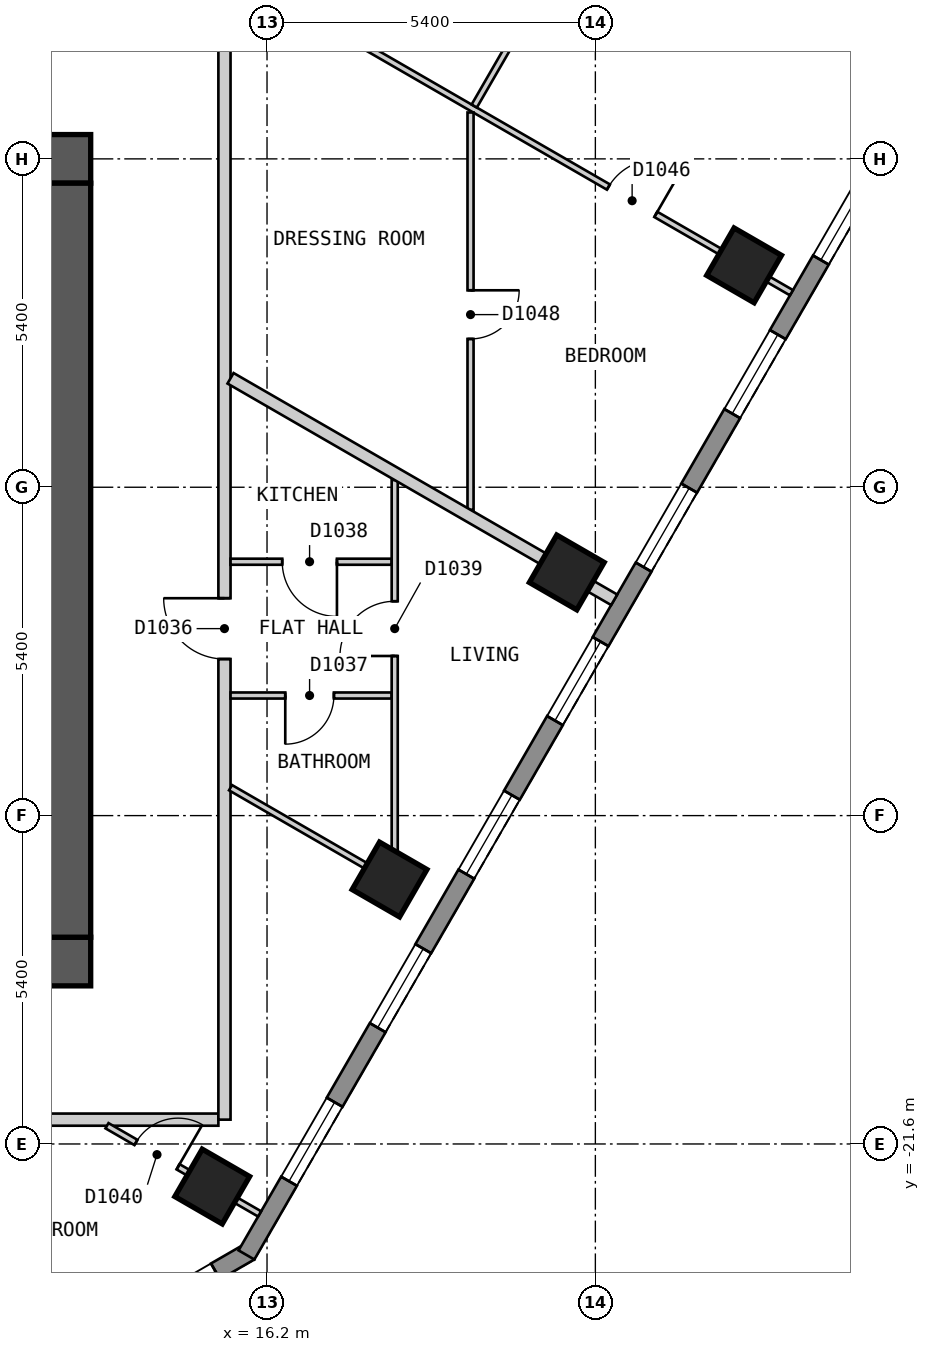
"""IFC4 building model, lengths in metres.
Left out: names, types, materials, properties, quantities, classifications, styles, units other than length and angle.
Written with IfcOpenShell. Run it as: python <this file> out.ifc"""

import sys

from ifc_helpers import new_model, si_unit, direction, frame, frame_2d, origin, origin_2d, place, context, subcontext, project, spatial, polyline, rectangle, outline, extrude, element, fill, save


model = new_model("IFC4")
c1 = context("Model", 3, precision=1e-05, world=origin(), true_north=direction((0.0, 1.0)))
c2 = subcontext(c1, "Body", "Model", "MODEL_VIEW")
j1 = project(units=[si_unit("LENGTHUNIT", "METRE"), si_unit("PLANEANGLEUNIT", "RADIAN")], contexts=[c1])
p1 = place(None, origin())
s1 = spatial("IfcSite", under=j1, at=p1, CompositionType="ELEMENT")
p2 = place(p1, origin())
s2 = spatial("IfcBuilding", under=s1, at=p2, CompositionType="ELEMENT")
p3 = place(p2, frame((0.0, 0.0, 126.6)))
s3 = spatial("IfcBuildingStorey", under=s2, at=p3, CompositionType="ELEMENT", Elevation=126.6)
for number, where, z_axis, x_axis in (
    (1, (15.299, -22.3, 0.0), (0.0, 0.0, 1.0), (0.5, 0.866, 0.0)),
    (2, (18.215, -17.251, 0.0), (0.0, 0.0, 1.0), (0.5, 0.866, 0.0)),
    (3, (21.13, -12.201, 0.0), (0.0, 0.0, 1.0), (0.5, 0.866, 0.0)),
    (4, (24.046, -7.151, 0.0), (0.0, 0.0, 1.0), (0.5, 0.866, 0.0)),
):
    element("IfcColumn", number, at=place(p3, frame(where, z_axis=z_axis, x_axis=x_axis)), inside=s3, PredefinedType="COLUMN", context=c2, shape_type="SweptSolid", body=[
        extrude(rectangle(XDim=0.9, YDim=0.9, at=origin_2d()), origin(), (0.0, 0.0, 1.0), 3.0),
    ])
p4 = place(p3, frame((-13.3, -18.6, 0.0), z_axis=(0.0, 0.0, 1.0), x_axis=(1.0, 0.0, 0.0)))
e5 = element("IfcWall", 5, at=p4, inside=s3, PredefinedType="SHEAR", context=c2, shape_type="SweptSolid", body=[
    extrude(rectangle(XDim=26.6, YDim=0.8, at=frame_2d((13.3, 0.0))), origin(), (0.0, 0.0, 1.0), 2.7),
])
p5 = place(p3, frame((-13.3, -5.4, 0.0), z_axis=(0.0, 0.0, 1.0), x_axis=(1.0, 0.0, 0.0)))
e6 = element("IfcWall", 6, at=p5, inside=s3, PredefinedType="SHEAR", context=c2, shape_type="SweptSolid", body=[
    extrude(rectangle(XDim=26.6, YDim=0.8, at=frame_2d((13.3, 0.0))), origin(), (0.0, 0.0, 1.0), 2.7),
])
p6 = place(p5, frame((23.65, 0.0, 0.0)))
e7 = element("IfcOpeningElement", 7, at=p6, cuts=e6, PredefinedType="OPENING", context=c2, shape_type="SweptSolid", body=[
    extrude(rectangle(XDim=1.2, YDim=2.1, at=frame_2d((0.6, 1.05))), frame((0.0, 0.41, 0.0), z_axis=(0.0, -1.0, 0.0), x_axis=(1.0, 0.0, 0.0)), (0.0, 0.0, 1.0), 0.82),
])
p7 = place(p3, frame((12.9, -18.2, 0.0), z_axis=(0.0, 0.0, 1.0), x_axis=(0.0, 1.0, 0.0)))
e8 = element("IfcWall", 8, at=p7, inside=s3, PredefinedType="SHEAR", context=c2, shape_type="SweptSolid", body=[
    extrude(rectangle(XDim=12.4, YDim=0.8, at=frame_2d((6.2, 0.0))), origin(), (0.0, 0.0, 1.0), 2.7),
])
p8 = place(p3, frame((11.587, -25.87, 0.0), z_axis=(0.0, 0.0, 1.0), x_axis=(0.866022959057, 0.500004234368, 0.0)))
e9 = element("IfcWall", 9, at=p8, inside=s3, PredefinedType="SOLIDWALL", context=c2, shape_type="SweptSolid", body=[
    extrude(outline(polyline([(0.0, -0.15), (5.0, -0.15), (4.92, 0.15), (0.08, 0.15), (0.0, -0.15)])), origin(), (0.0, 0.0, 1.0), 2.7),
])
p9 = place(p8, frame((0.65, 0.0, 0.15)))
e10 = element("IfcOpeningElement", 10, at=p9, cuts=e9, PredefinedType="OPENING", context=c2, shape_type="SweptSolid", body=[
    extrude(rectangle(XDim=1.2, YDim=2.1, at=frame_2d((0.6, 1.05))), frame((0.0, 0.16, 0.0), z_axis=(0.0, -1.0, 0.0), x_axis=(1.0, 0.0, 0.0)), (0.0, 0.0, 1.0), 0.32),
])
p10 = place(p8, frame((3.149, 0.0, 0.15)))
e11 = element("IfcOpeningElement", 11, at=p10, cuts=e9, PredefinedType="OPENING", context=c2, shape_type="SweptSolid", body=[
    extrude(rectangle(XDim=1.2, YDim=2.1, at=frame_2d((0.6, 1.05))), frame((0.0, 0.16, 0.0), z_axis=(0.0, -1.0, 0.0), x_axis=(1.0, 0.0, 0.0)), (0.0, 0.0, 1.0), 0.32),
])
p11 = place(p3, frame((15.862, -23.425, 0.0), z_axis=(0.0, 0.0, 1.0), x_axis=(0.500017503135, 0.866015298109, 0.0)))
e12 = element("IfcWall", 12, at=p11, inside=s3, PredefinedType="SOLIDWALL", context=c2, shape_type="SweptSolid", body=[
    extrude(outline(polyline([(0.0, -0.15), (24.711, -0.15), (24.631, 0.15), (0.08, 0.15), (0.0, -0.15)])), origin(), (0.0, 0.0, 1.0), 2.7),
])
p12 = place(p11, frame((1.4, 0.0, 0.15)))
e13 = element("IfcOpeningElement", 13, at=p12, cuts=e12, PredefinedType="OPENING", context=c2, shape_type="SweptSolid", body=[
    extrude(rectangle(XDim=1.5, YDim=2.1, at=frame_2d((0.75, 1.05))), frame((0.0, 0.16, 0.0), z_axis=(0.0, -1.0, 0.0), x_axis=(1.0, 0.0, 0.0)), (0.0, 0.0, 1.0), 0.32),
])
p13 = place(p11, frame((4.316, 0.0, 0.15)))
e14 = element("IfcOpeningElement", 14, at=p13, cuts=e12, PredefinedType="OPENING", context=c2, shape_type="SweptSolid", body=[
    extrude(rectangle(XDim=1.5, YDim=2.1, at=frame_2d((0.75, 1.05))), frame((0.0, 0.16, 0.0), z_axis=(0.0, -1.0, 0.0), x_axis=(1.0, 0.0, 0.0)), (0.0, 0.0, 1.0), 0.32),
])
p14 = place(p11, frame((7.231, 0.0, 0.15)))
e15 = element("IfcOpeningElement", 15, at=p14, cuts=e12, PredefinedType="OPENING", context=c2, shape_type="SweptSolid", body=[
    extrude(rectangle(XDim=1.5, YDim=2.1, at=frame_2d((0.75, 1.05))), frame((0.0, 0.16, 0.0), z_axis=(0.0, -1.0, 0.0), x_axis=(1.0, 0.0, 0.0)), (0.0, 0.0, 1.0), 0.32),
])
p15 = place(p11, frame((10.147, 0.0, 0.15)))
e16 = element("IfcOpeningElement", 16, at=p15, cuts=e12, PredefinedType="OPENING", context=c2, shape_type="SweptSolid", body=[
    extrude(rectangle(XDim=1.5, YDim=2.1, at=frame_2d((0.75, 1.05))), frame((0.0, 0.16, 0.0), z_axis=(0.0, -1.0, 0.0), x_axis=(1.0, 0.0, 0.0)), (0.0, 0.0, 1.0), 0.32),
])
p16 = place(p11, frame((13.062, 0.0, 0.15)))
e17 = element("IfcOpeningElement", 17, at=p16, cuts=e12, PredefinedType="OPENING", context=c2, shape_type="SweptSolid", body=[
    extrude(rectangle(XDim=1.5, YDim=2.1, at=frame_2d((0.75, 1.05))), frame((0.0, 0.16, 0.0), z_axis=(0.0, -1.0, 0.0), x_axis=(1.0, 0.0, 0.0)), (0.0, 0.0, 1.0), 0.32),
])
p17 = place(p11, frame((15.977, 0.0, 0.15)))
e18 = element("IfcOpeningElement", 18, at=p17, cuts=e12, PredefinedType="OPENING", context=c2, shape_type="SweptSolid", body=[
    extrude(rectangle(XDim=1.5, YDim=2.1, at=frame_2d((0.75, 1.05))), frame((0.0, 0.16, 0.0), z_axis=(0.0, -1.0, 0.0), x_axis=(1.0, 0.0, 0.0)), (0.0, 0.0, 1.0), 0.32),
])
p18 = place(p11, frame((18.893, 0.0, 0.15)))
e19 = element("IfcOpeningElement", 19, at=p18, cuts=e12, PredefinedType="OPENING", context=c2, shape_type="SweptSolid", body=[
    extrude(rectangle(XDim=1.5, YDim=2.1, at=frame_2d((0.75, 1.05))), frame((0.0, 0.16, 0.0), z_axis=(0.0, -1.0, 0.0), x_axis=(1.0, 0.0, 0.0)), (0.0, 0.0, 1.0), 0.32),
])
p19 = place(p11, frame((21.809, 0.0, 0.15)))
e20 = element("IfcOpeningElement", 20, at=p19, cuts=e12, PredefinedType="OPENING", context=c2, shape_type="SweptSolid", body=[
    extrude(rectangle(XDim=1.5, YDim=2.1, at=frame_2d((0.75, 1.05))), frame((0.0, 0.16, 0.0), z_axis=(0.0, -1.0, 0.0), x_axis=(1.0, 0.0, 0.0)), (0.0, 0.0, 1.0), 0.32),
])
p20 = place(p3, frame((-15.499, -21.2, 0.0), z_axis=(0.0, 0.0, 1.0), x_axis=(1.0, 0.0, 0.0)))
e21 = element("IfcWall", 21, at=p20, inside=s3, PredefinedType="PARTITIONING", context=c2, shape_type="SweptSolid", body=[
    extrude(rectangle(XDim=30.899, YDim=0.2, at=frame_2d((15.449, 0.0))), origin(), (0.0, 0.0, 1.0), 2.7),
])
p21 = place(p20, frame((12.258, 0.0, 0.0)))
e22 = element("IfcOpeningElement", 22, at=p21, cuts=e21, PredefinedType="OPENING", context=c2, shape_type="SweptSolid", body=[
    extrude(rectangle(XDim=1.0, YDim=2.1, at=frame_2d((0.5, 1.05))), frame((0.0, 0.11, 0.0), z_axis=(0.0, -1.0, 0.0), x_axis=(1.0, 0.0, 0.0)), (0.0, 0.0, 1.0), 0.22),
])
p22 = place(p3, frame((15.5, -21.2, 0.0), z_axis=(0.0, 0.0, 1.0), x_axis=(0.0, 1.0, 0.0)))
e23 = element("IfcWall", 23, at=p22, inside=s3, PredefinedType="PARTITIONING", context=c2, shape_type="SweptSolid", body=[
    extrude(rectangle(XDim=17.648, YDim=0.2, at=frame_2d((8.824, 0.0))), origin(), (0.0, 0.0, 1.0), 2.7),
])
p23 = place(p22, frame((7.575, 0.0, 0.0)))
e24 = element("IfcOpeningElement", 24, at=p23, cuts=e23, PredefinedType="OPENING", context=c2, shape_type="SweptSolid", body=[
    extrude(rectangle(XDim=1.0, YDim=2.1, at=frame_2d((0.5, 1.05))), frame((0.0, 0.11, 0.0), z_axis=(0.0, -1.0, 0.0), x_axis=(1.0, 0.0, 0.0)), (0.0, 0.0, 1.0), 0.22),
])
p24 = place(p3, frame((15.6, -15.741, 0.0), z_axis=(0.0, 0.0, 1.0), x_axis=(0.866010195725, -0.500026340207, 0.0)))
e25 = element("IfcWall", 25, at=p24, inside=s3, PredefinedType="PARTITIONING", context=c2, shape_type="SweptSolid", body=[
    extrude(rectangle(XDim=3.06, YDim=0.1, at=frame_2d((1.53, 0.0))), origin(), (0.0, 0.0, 1.0), 2.7),
])
p25 = place(p3, frame((13.568, -21.3, 0.0), z_axis=(0.0, 0.0, 1.0), x_axis=(0.865885342641, -0.500242514586, 0.0)))
e26 = element("IfcWall", 26, at=p25, inside=s3, PredefinedType="PARTITIONING", context=c2, shape_type="SweptSolid", body=[
    extrude(rectangle(XDim=2.898, YDim=0.1, at=frame_2d((1.449, 0.0))), origin(), (0.0, 0.0, 1.0), 2.7),
])
p26 = place(p25, frame((0.55, 0.0, 0.0)))
e27 = element("IfcOpeningElement", 27, at=p26, cuts=e26, PredefinedType="OPENING", context=c2, shape_type="SweptSolid", body=[
    extrude(rectangle(XDim=0.8, YDim=2.1, at=frame_2d((0.4, 1.05))), frame((0.0, 0.06, 0.0), z_axis=(0.0, -1.0, 0.0), x_axis=(1.0, 0.0, 0.0)), (0.0, 0.0, 1.0), 0.12),
])
p27 = place(p3, frame((16.165, -2.601, 0.0), z_axis=(0.0, 0.0, 1.0), x_axis=(0.866016855193, -0.500014806302, 0.0)))
e28 = element("IfcWall", 28, at=p27, inside=s3, PredefinedType="PARTITIONING", context=c2, shape_type="SweptSolid", body=[
    extrude(rectangle(XDim=10.0, YDim=0.1, at=frame_2d((5.0, 0.0))), origin(), (0.0, 0.0, 1.0), 2.7),
])
p28 = place(p27, frame((6.524, 0.0, 0.0)))
e29 = element("IfcOpeningElement", 29, at=p28, cuts=e28, PredefinedType="OPENING", context=c2, shape_type="SweptSolid", body=[
    extrude(rectangle(XDim=0.9, YDim=2.1, at=frame_2d((0.45, 1.05))), frame((0.0, 0.06, 0.0), z_axis=(0.0, -1.0, 0.0), x_axis=(1.0, 0.0, 0.0)), (0.0, 0.0, 1.0), 0.12),
])
p29 = place(p3, frame((15.6, -12.025, 0.0), z_axis=(0.0, 0.0, 1.0), x_axis=(1.0, 0.0, 0.0)))
e30 = element("IfcWall", 30, at=p29, inside=s3, PredefinedType="PARTITIONING", context=c2, shape_type="SweptSolid", body=[
    extrude(rectangle(XDim=2.65, YDim=0.1, at=frame_2d((1.325, 0.0))), origin(), (0.0, 0.0, 1.0), 2.7),
])
p30 = place(p29, frame((0.85, 0.0, 0.0)))
e31 = element("IfcOpeningElement", 31, at=p30, cuts=e30, PredefinedType="OPENING", context=c2, shape_type="SweptSolid", body=[
    extrude(rectangle(XDim=0.9, YDim=2.1, at=frame_2d((0.45, 1.05))), frame((0.0, 0.06, 0.0), z_axis=(0.0, -1.0, 0.0), x_axis=(1.0, 0.0, 0.0)), (0.0, 0.0, 1.0), 0.12),
])
p31 = place(p3, frame((15.6, -14.225, 0.0), z_axis=(0.0, 0.0, 1.0), x_axis=(1.0, 0.0, 0.0)))
e32 = element("IfcWall", 32, at=p31, inside=s3, PredefinedType="PARTITIONING", context=c2, shape_type="SweptSolid", body=[
    extrude(rectangle(XDim=2.65, YDim=0.1, at=frame_2d((1.325, 0.0))), origin(), (0.0, 0.0, 1.0), 2.7),
])
p32 = place(p31, frame((0.9, 0.0, 0.0)))
e33 = element("IfcOpeningElement", 33, at=p32, cuts=e32, PredefinedType="OPENING", context=c2, shape_type="SweptSolid", body=[
    extrude(rectangle(XDim=0.8, YDim=2.1, at=frame_2d((0.4, 1.05))), frame((0.0, 0.06, 0.0), z_axis=(0.0, -1.0, 0.0), x_axis=(1.0, 0.0, 0.0)), (0.0, 0.0, 1.0), 0.12),
])
p33 = place(p3, frame((19.608, -4.531, 0.0), z_axis=(0.0, 0.0, 1.0), x_axis=(0.500035555316, 0.86600487494, 0.0)))
e34 = element("IfcWall", 34, at=p33, inside=s3, PredefinedType="PARTITIONING", context=c2, shape_type="SweptSolid", body=[
    extrude(rectangle(XDim=5.58, YDim=0.1, at=frame_2d((2.79, 0.0))), origin(), (0.0, 0.0, 1.0), 2.7),
])
p34 = place(p33, frame((2.372, 0.0, 0.0)))
e35 = element("IfcOpeningElement", 35, at=p34, cuts=e34, PredefinedType="OPENING", context=c2, shape_type="SweptSolid", body=[
    extrude(rectangle(XDim=0.9, YDim=2.1, at=frame_2d((0.45, 1.05))), frame((0.0, 0.06, 0.0), z_axis=(0.0, -1.0, 0.0), x_axis=(1.0, 0.0, 0.0)), (0.0, 0.0, 1.0), 0.12),
])
p35 = place(p3, frame((18.3, -17.3, 0.0), z_axis=(0.0, 0.0, 1.0), x_axis=(0.0, 1.0, 0.0)))
e36 = element("IfcWall", 36, at=p35, inside=s3, PredefinedType="PARTITIONING", context=c2, shape_type="SweptSolid", body=[
    extrude(rectangle(XDim=6.618, YDim=0.1, at=frame_2d((3.309, 0.0))), origin(), (0.0, 0.0, 1.0), 2.7),
])
p36 = place(p35, frame((3.725, 0.0, 0.0)))
e37 = element("IfcOpeningElement", 37, at=p36, cuts=e36, PredefinedType="OPENING", context=c2, shape_type="SweptSolid", body=[
    extrude(rectangle(XDim=0.9, YDim=2.1, at=frame_2d((0.45, 1.05))), frame((0.0, 0.06, 0.0), z_axis=(0.0, -1.0, 0.0), x_axis=(1.0, 0.0, 0.0)), (0.0, 0.0, 1.0), 0.12),
])
p37 = place(p3, frame((19.547, -11.171, 0.0), z_axis=(0.0, 0.0, 1.0), x_axis=(0.0, 1.0, 0.0)))
e38 = element("IfcWall", 38, at=p37, inside=s3, PredefinedType="PARTITIONING", context=c2, shape_type="SweptSolid", body=[
    extrude(rectangle(XDim=6.534, YDim=0.1, at=frame_2d((3.267, 0.0))), origin(), (0.0, 0.0, 1.0), 2.7),
])
p38 = place(p37, frame((2.81, 0.0, 0.0)))
e39 = element("IfcOpeningElement", 39, at=p38, cuts=e38, PredefinedType="OPENING", context=c2, shape_type="SweptSolid", body=[
    extrude(rectangle(XDim=0.8, YDim=2.1, at=frame_2d((0.4, 1.05))), frame((0.0, 0.06, 0.0), z_axis=(0.0, -1.0, 0.0), x_axis=(1.0, 0.0, 0.0)), (0.0, 0.0, 1.0), 0.12),
])
p39 = place(p3, frame((15.6, -9.008, 0.0), z_axis=(0.0, 0.0, 1.0), x_axis=(0.866034366408, -0.499984475959, 0.0)))
e40 = element("IfcWall", 40, at=p39, inside=s3, PredefinedType="PARTITIONING", context=c2, shape_type="SweptSolid", body=[
    extrude(rectangle(XDim=7.286, YDim=0.2, at=frame_2d((3.643, 0.0))), origin(), (0.0, 0.0, 1.0), 2.7),
])
p40 = place(p10, origin())
e41 = element("IfcWindow", 41, at=p40, inside=s3, PartitioningType="SINGLE_PANEL", PredefinedType="WINDOW", context=c2, shape_type="SweptSolid", body=[
    extrude(rectangle(XDim=1.2, YDim=2.1, at=frame_2d((0.6, 1.05))), frame((0.0, 0.03, 0.0), z_axis=(0.0, -1.0, 0.0), x_axis=(1.0, 0.0, 0.0)), (0.0, 0.0, 1.0), 0.06),
])
fill(e11, e41)
p41 = place(p12, origin())
e42 = element("IfcWindow", 42, at=p41, inside=s3, PartitioningType="SINGLE_PANEL", PredefinedType="WINDOW", context=c2, shape_type="SweptSolid", body=[
    extrude(rectangle(XDim=1.5, YDim=2.1, at=frame_2d((0.75, 1.05))), frame((0.0, 0.03, 0.0), z_axis=(0.0, -1.0, 0.0), x_axis=(1.0, 0.0, 0.0)), (0.0, 0.0, 1.0), 0.06),
])
fill(e13, e42)
p42 = place(p13, origin())
e43 = element("IfcWindow", 43, at=p42, inside=s3, PartitioningType="SINGLE_PANEL", PredefinedType="WINDOW", context=c2, shape_type="SweptSolid", body=[
    extrude(rectangle(XDim=1.5, YDim=2.1, at=frame_2d((0.75, 1.05))), frame((0.0, 0.03, 0.0), z_axis=(0.0, -1.0, 0.0), x_axis=(1.0, 0.0, 0.0)), (0.0, 0.0, 1.0), 0.06),
])
fill(e14, e43)
p43 = place(p14, origin())
e44 = element("IfcWindow", 44, at=p43, inside=s3, PartitioningType="SINGLE_PANEL", PredefinedType="WINDOW", context=c2, shape_type="SweptSolid", body=[
    extrude(rectangle(XDim=1.5, YDim=2.1, at=frame_2d((0.75, 1.05))), frame((0.0, 0.03, 0.0), z_axis=(0.0, -1.0, 0.0), x_axis=(1.0, 0.0, 0.0)), (0.0, 0.0, 1.0), 0.06),
])
fill(e15, e44)
p44 = place(p15, origin())
e45 = element("IfcWindow", 45, at=p44, inside=s3, PartitioningType="SINGLE_PANEL", PredefinedType="WINDOW", context=c2, shape_type="SweptSolid", body=[
    extrude(rectangle(XDim=1.5, YDim=2.1, at=frame_2d((0.75, 1.05))), frame((0.0, 0.03, 0.0), z_axis=(0.0, -1.0, 0.0), x_axis=(1.0, 0.0, 0.0)), (0.0, 0.0, 1.0), 0.06),
])
fill(e16, e45)
p45 = place(p16, origin())
e46 = element("IfcWindow", 46, at=p45, inside=s3, PartitioningType="SINGLE_PANEL", PredefinedType="WINDOW", context=c2, shape_type="SweptSolid", body=[
    extrude(rectangle(XDim=1.5, YDim=2.1, at=frame_2d((0.75, 1.05))), frame((0.0, 0.03, 0.0), z_axis=(0.0, -1.0, 0.0), x_axis=(1.0, 0.0, 0.0)), (0.0, 0.0, 1.0), 0.06),
])
fill(e17, e46)
p46 = place(p17, origin())
e47 = element("IfcWindow", 47, at=p46, inside=s3, PartitioningType="SINGLE_PANEL", PredefinedType="WINDOW", context=c2, shape_type="SweptSolid", body=[
    extrude(rectangle(XDim=1.5, YDim=2.1, at=frame_2d((0.75, 1.05))), frame((0.0, 0.03, 0.0), z_axis=(0.0, -1.0, 0.0), x_axis=(1.0, 0.0, 0.0)), (0.0, 0.0, 1.0), 0.06),
])
fill(e18, e47)
p47 = place(p18, origin())
e48 = element("IfcWindow", 48, at=p47, inside=s3, PartitioningType="SINGLE_PANEL", PredefinedType="WINDOW", context=c2, shape_type="SweptSolid", body=[
    extrude(rectangle(XDim=1.5, YDim=2.1, at=frame_2d((0.75, 1.05))), frame((0.0, 0.03, 0.0), z_axis=(0.0, -1.0, 0.0), x_axis=(1.0, 0.0, 0.0)), (0.0, 0.0, 1.0), 0.06),
])
fill(e19, e48)
p48 = place(p23, origin())
e49 = element("IfcDoor", 49, at=p48, inside=s3, OperationType="SINGLE_SWING_RIGHT", PredefinedType="DOOR", context=c2, shape_type="SweptSolid", body=[
    extrude(rectangle(XDim=1.0, YDim=2.1, at=frame_2d((0.5, 1.05))), frame((0.0, 0.025, 0.0), z_axis=(0.0, -1.0, 0.0), x_axis=(1.0, 0.0, 0.0)), (0.0, 0.0, 1.0), 0.05),
])
fill(e24, e49)
p49 = place(p32, origin())
e50 = element("IfcDoor", 50, at=p49, inside=s3, OperationType="SINGLE_SWING_LEFT", PredefinedType="DOOR", context=c2, shape_type="SweptSolid", body=[
    extrude(rectangle(XDim=0.8, YDim=2.1, at=frame_2d((0.4, 1.05))), frame((0.0, 0.025, 0.0), z_axis=(0.0, -1.0, 0.0), x_axis=(1.0, 0.0, 0.0)), (0.0, 0.0, 1.0), 0.05),
])
fill(e33, e50)
p50 = place(p30, origin())
e51 = element("IfcDoor", 51, at=p50, inside=s3, OperationType="SINGLE_SWING_RIGHT", PredefinedType="DOOR", context=c2, shape_type="SweptSolid", body=[
    extrude(rectangle(XDim=0.9, YDim=2.1, at=frame_2d((0.45, 1.05))), frame((0.0, 0.025, 0.0), z_axis=(0.0, -1.0, 0.0), x_axis=(1.0, 0.0, 0.0)), (0.0, 0.0, 1.0), 0.05),
])
fill(e31, e51)
p51 = place(p36, origin())
e52 = element("IfcDoor", 52, at=p51, inside=s3, OperationType="SINGLE_SWING_LEFT", PredefinedType="DOOR", context=c2, shape_type="SweptSolid", body=[
    extrude(rectangle(XDim=0.9, YDim=2.1, at=frame_2d((0.45, 1.05))), frame((0.0, 0.025, 0.0), z_axis=(0.0, -1.0, 0.0), x_axis=(1.0, 0.0, 0.0)), (0.0, 0.0, 1.0), 0.05),
])
fill(e37, e52)
p52 = place(p26, origin())
e53 = element("IfcDoor", 53, at=p52, inside=s3, OperationType="SINGLE_SWING_RIGHT", PredefinedType="DOOR", context=c2, shape_type="SweptSolid", body=[
    extrude(rectangle(XDim=0.8, YDim=2.1, at=frame_2d((0.4, 1.05))), frame((0.0, 0.025, 0.0), z_axis=(0.0, -1.0, 0.0), x_axis=(1.0, 0.0, 0.0)), (0.0, 0.0, 1.0), 0.05),
])
fill(e27, e53)
p53 = place(p28, origin())
e54 = element("IfcDoor", 54, at=p53, inside=s3, OperationType="SINGLE_SWING_RIGHT", PredefinedType="DOOR", context=c2, shape_type="SweptSolid", body=[
    extrude(rectangle(XDim=0.9, YDim=2.1, at=frame_2d((0.45, 1.05))), frame((0.0, 0.025, 0.0), z_axis=(0.0, -1.0, 0.0), x_axis=(1.0, 0.0, 0.0)), (0.0, 0.0, 1.0), 0.05),
])
fill(e29, e54)
p54 = place(p38, origin())
e55 = element("IfcDoor", 55, at=p54, inside=s3, OperationType="SINGLE_SWING_RIGHT", PredefinedType="DOOR", context=c2, shape_type="SweptSolid", body=[
    extrude(rectangle(XDim=0.8, YDim=2.1, at=frame_2d((0.4, 1.05))), frame((0.0, 0.025, 0.0), z_axis=(0.0, -1.0, 0.0), x_axis=(1.0, 0.0, 0.0)), (0.0, 0.0, 1.0), 0.05),
])
fill(e39, e55)
save(model, sys.argv[1])
